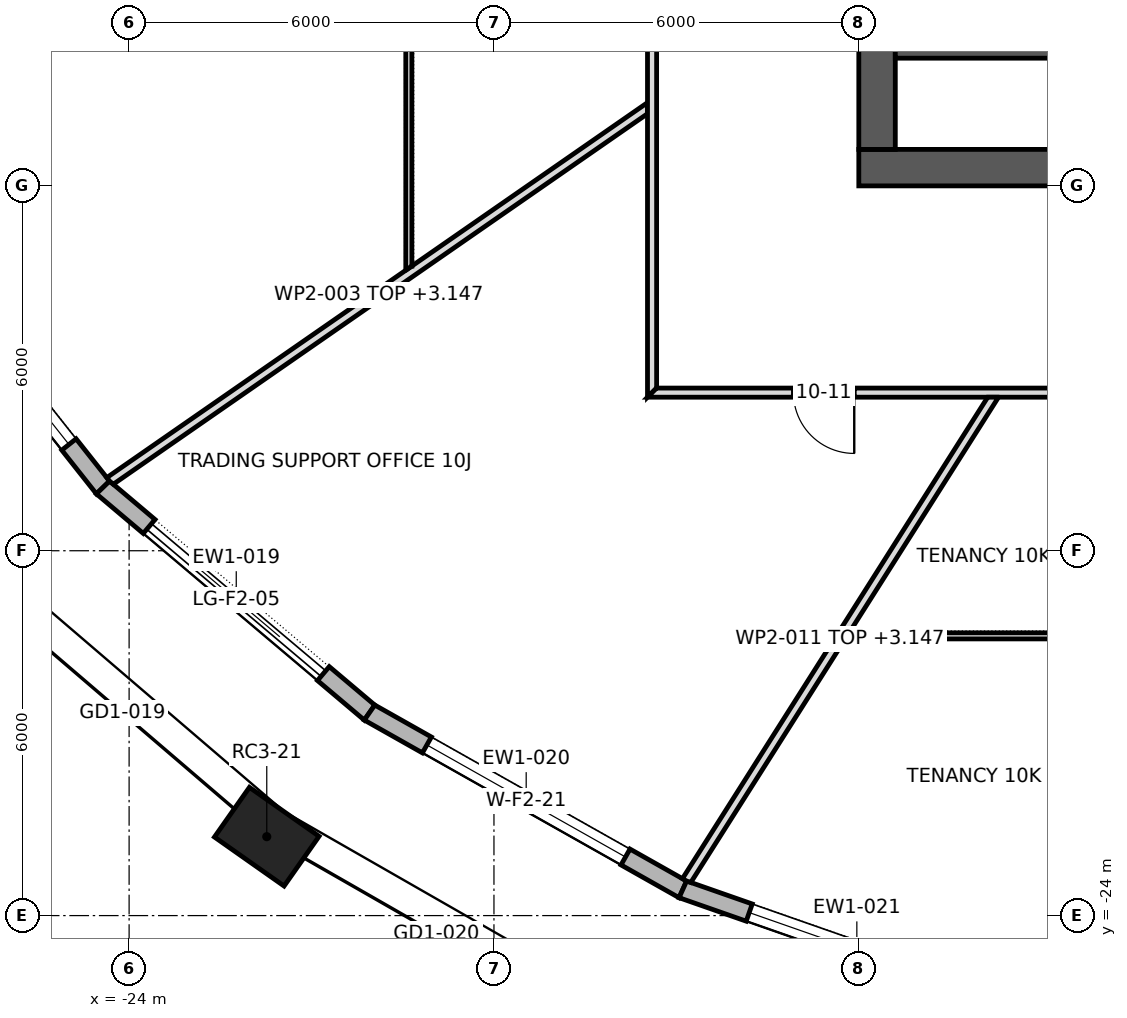
"""IFC4 building model, lengths in metres.
Left out: names, types, materials, properties, quantities, classifications, styles, units other than length and angle.
Written with IfcOpenShell. Run it as: python <this file> out.ifc"""

import sys

from ifc_helpers import new_model, si_unit, direction, frame, frame_2d, origin, origin_2d, place, context, subcontext, project, spatial, polyline, rectangle, outline, extrude, element, fill, save


model = new_model("IFC4")
c1 = context("Model", 3, precision=1e-05, world=origin(), true_north=direction((0.0, 1.0)))
c2 = subcontext(c1, "Body", "Model", "MODEL_VIEW")
j1 = project(units=[si_unit("LENGTHUNIT", "METRE"), si_unit("PLANEANGLEUNIT", "RADIAN")], contexts=[c1])
p1 = place(None, origin())
s1 = spatial("IfcSite", under=j1, at=p1, CompositionType="ELEMENT")
p2 = place(p1, origin())
s2 = spatial("IfcBuilding", under=s1, at=p2, CompositionType="ELEMENT")
p3 = place(p2, frame((0.0, 0.0, 142.3)))
s3 = spatial("IfcBuildingStorey", under=s2, at=p3, CompositionType="ELEMENT", Elevation=142.3)
p4 = place(p3, frame((-21.736, -22.702, 0.0), z_axis=(0.0, 0.0, 1.0), x_axis=(0.817907783846, -0.57534933486, 0.0)))
e1 = element("IfcColumn", 1, at=p4, inside=s3, PredefinedType="COLUMN", context=c2, shape_type="SweptSolid", body=[
    extrude(rectangle(XDim=1.4, YDim=1.0, at=origin_2d()), origin(), (0.0, 0.0, 1.0), 4.2),
])
p5 = place(p3, frame((-12.0, -11.7, 0.0), z_axis=(0.0, 0.0, 1.0), x_axis=(1.0, 0.0, 0.0)))
e2 = element("IfcWall", 2, at=p5, inside=s3, PredefinedType="SHEAR", context=c2, shape_type="SweptSolid", body=[
    extrude(rectangle(XDim=24.0, YDim=0.6, at=frame_2d((12.0, 0.0))), origin(), (0.0, 0.0, 1.0), 4.2),
])
p6 = place(p5, frame((9.975, 0.0, 0.0)))
e3 = element("IfcOpeningElement", 3, at=p6, cuts=e2, PredefinedType="OPENING", context=c2, shape_type="SweptSolid", body=[
    extrude(rectangle(XDim=0.9, YDim=2.1, at=frame_2d((0.45, 1.05))), frame((0.0, 0.312, 0.0), z_axis=(0.0, -1.0, 0.0), x_axis=(1.0, 0.0, 0.0)), (0.0, 0.0, 1.0), 0.624),
])
p7 = place(p5, frame((3.8, 0.0, 0.0)))
e4 = element("IfcOpeningElement", 4, at=p7, cuts=e2, PredefinedType="OPENING", context=c2, shape_type="SweptSolid", body=[
    extrude(rectangle(XDim=0.8, YDim=2.1, at=frame_2d((0.4, 1.05))), frame((0.0, 0.312, 0.0), z_axis=(0.0, -1.0, 0.0), x_axis=(1.0, 0.0, 0.0)), (0.0, 0.0, 1.0), 0.624),
])
p8 = place(p5, frame((5.8, 0.0, 0.0)))
e5 = element("IfcOpeningElement", 5, at=p8, cuts=e2, PredefinedType="OPENING", context=c2, shape_type="SweptSolid", body=[
    extrude(rectangle(XDim=0.8, YDim=2.1, at=frame_2d((0.4, 1.05))), frame((0.0, 0.312, 0.0), z_axis=(0.0, -1.0, 0.0), x_axis=(1.0, 0.0, 0.0)), (0.0, 0.0, 1.0), 0.624),
])
p9 = place(p5, frame((7.5, 0.0, 0.0)))
e6 = element("IfcOpeningElement", 6, at=p9, cuts=e2, PredefinedType="OPENING", context=c2, shape_type="SweptSolid", body=[
    extrude(rectangle(XDim=0.8, YDim=2.1, at=frame_2d((0.4, 1.05))), frame((0.0, 0.312, 0.0), z_axis=(0.0, -1.0, 0.0), x_axis=(1.0, 0.0, 0.0)), (0.0, 0.0, 1.0), 0.624),
])
p10 = place(p5, frame((15.85, 0.0, 0.0)))
e7 = element("IfcOpeningElement", 7, at=p10, cuts=e2, PredefinedType="OPENING", context=c2, shape_type="SweptSolid", body=[
    extrude(rectangle(XDim=0.8, YDim=2.1, at=frame_2d((0.4, 1.05))), frame((0.0, 0.312, 0.0), z_axis=(0.0, -1.0, 0.0), x_axis=(1.0, 0.0, 0.0)), (0.0, 0.0, 1.0), 0.624),
])
p11 = place(p3, frame((-11.7, -11.4, 0.0), z_axis=(0.0, 0.0, 1.0), x_axis=(0.0, 1.0, 0.0)))
e8 = element("IfcWall", 8, at=p11, inside=s3, PredefinedType="SHEAR", context=c2, shape_type="SweptSolid", body=[
    extrude(rectangle(XDim=22.8, YDim=0.6, at=frame_2d((11.4, 0.0))), origin(), (0.0, 0.0, 1.0), 4.2),
])
p12 = place(p11, frame((10.2, 0.0, 0.0)))
e9 = element("IfcOpeningElement", 9, at=p12, cuts=e8, PredefinedType="OPENING", context=c2, shape_type="SweptSolid", body=[
    extrude(rectangle(XDim=2.4, YDim=2.1, at=frame_2d((1.2, 1.05))), frame((0.0, 0.312, 0.0), z_axis=(0.0, -1.0, 0.0), x_axis=(1.0, 0.0, 0.0)), (0.0, 0.0, 1.0), 0.624),
])
p13 = place(p11, frame((18.925, 0.0, 0.0)))
e10 = element("IfcOpeningElement", 10, at=p13, cuts=e8, PredefinedType="OPENING", context=c2, shape_type="SweptSolid", body=[
    extrude(rectangle(XDim=1.2, YDim=2.1, at=frame_2d((0.6, 1.05))), frame((0.0, 0.312, 0.0), z_axis=(0.0, -1.0, 0.0), x_axis=(1.0, 0.0, 0.0)), (0.0, 0.0, 1.0), 0.624),
])
p14 = place(p11, frame((2.675, 0.0, 0.0)))
e11 = element("IfcOpeningElement", 11, at=p14, cuts=e8, PredefinedType="OPENING", context=c2, shape_type="SweptSolid", body=[
    extrude(rectangle(XDim=1.2, YDim=2.1, at=frame_2d((0.6, 1.05))), frame((0.0, 0.312, 0.0), z_axis=(0.0, -1.0, 0.0), x_axis=(1.0, 0.0, 0.0)), (0.0, 0.0, 1.0), 0.624),
])
p15 = place(p3, frame((-27.876, -12.605, 0.0), z_axis=(0.0, 0.0, 1.0), x_axis=(0.620520511988, -0.784190215574, 0.0)))
e12 = element("IfcWall", 12, at=p15, inside=s3, PredefinedType="STANDARD", context=c2, shape_type="SweptSolid", body=[
    extrude(outline(polyline([(-0.016, -0.15), (5.569, -0.15), (5.538, 0.15), (0.016, 0.15), (-0.016, -0.15)])), origin(), (0.0, 0.0, 1.0), 3.9),
])
p16 = place(p15, frame((0.902, 0.0, 0.6)))
e13 = element("IfcOpeningElement", 13, at=p16, cuts=e12, PredefinedType="OPENING", context=c2, shape_type="SweptSolid", body=[
    extrude(rectangle(XDim=3.75, YDim=2.85, at=frame_2d((1.875, 1.425))), frame((0.0, 0.162, 0.0), z_axis=(0.0, -1.0, 0.0), x_axis=(1.0, 0.0, 0.0)), (0.0, 0.0, 1.0), 0.324),
])
p17 = place(p3, frame((-24.43, -16.96, 0.0), z_axis=(0.0, 0.0, 1.0), x_axis=(0.764047627809, -0.64515984255, 0.0)))
e14 = element("IfcWall", 14, at=p17, inside=s3, PredefinedType="STANDARD", context=c2, shape_type="SweptSolid", body=[
    extrude(outline(polyline([(-0.015, -0.15), (5.752, -0.15), (5.723, 0.15), (0.015, 0.15), (-0.015, -0.15)])), origin(), (0.0, 0.0, 1.0), 3.9),
])
p18 = place(p17, frame((0.994, 0.0, 0.0)))
e15 = element("IfcOpeningElement", 15, at=p18, cuts=e14, PredefinedType="OPENING", context=c2, shape_type="SweptSolid", body=[
    extrude(rectangle(XDim=3.75, YDim=3.45, at=frame_2d((1.875, 1.725))), frame((0.0, 0.162, 0.0), z_axis=(0.0, -1.0, 0.0), x_axis=(1.0, 0.0, 0.0)), (0.0, 0.0, 1.0), 0.324),
])
p19 = place(p3, frame((-20.046, -20.661, 0.0), z_axis=(0.0, 0.0, 1.0), x_axis=(0.870912346166, -0.491438384028, 0.0)))
e16 = element("IfcWall", 16, at=p19, inside=s3, PredefinedType="STANDARD", context=c2, shape_type="SweptSolid", body=[
    extrude(outline(polyline([(-0.014, -0.15), (5.929, -0.15), (5.902, 0.15), (0.014, 0.15), (-0.014, -0.15)])), origin(), (0.0, 0.0, 1.0), 3.9),
])
p20 = place(p19, frame((1.083, 0.0, 0.6)))
e17 = element("IfcOpeningElement", 17, at=p20, cuts=e16, PredefinedType="OPENING", context=c2, shape_type="SweptSolid", body=[
    extrude(rectangle(XDim=3.75, YDim=2.85, at=frame_2d((1.875, 1.425))), frame((0.0, 0.162, 0.0), z_axis=(0.0, -1.0, 0.0), x_axis=(1.0, 0.0, 0.0)), (0.0, 0.0, 1.0), 0.324),
])
p21 = place(p3, frame((-14.894, -23.569, 0.0), z_axis=(0.0, 0.0, 1.0), x_axis=(0.943925510212, -0.330158494016, 0.0)))
e18 = element("IfcWall", 18, at=p21, inside=s3, PredefinedType="STANDARD", context=c2, shape_type="SweptSolid", body=[
    extrude(outline(polyline([(-0.013, -0.15), (6.076, -0.15), (6.05, 0.15), (0.013, 0.15), (-0.013, -0.15)])), origin(), (0.0, 0.0, 1.0), 3.9),
])
p22 = place(p21, frame((1.156, 0.0, 0.6)))
e19 = element("IfcOpeningElement", 19, at=p22, cuts=e18, PredefinedType="OPENING", context=c2, shape_type="SweptSolid", body=[
    extrude(rectangle(XDim=3.75, YDim=2.85, at=frame_2d((1.875, 1.425))), frame((0.0, 0.162, 0.0), z_axis=(0.0, -1.0, 0.0), x_axis=(1.0, 0.0, 0.0)), (0.0, 0.0, 1.0), 0.324),
])
p23 = place(p3, frame((-11.4, -9.825, 0.0), z_axis=(0.0, 0.0, 1.0), x_axis=(1.0, 0.0, 0.0)))
e20 = element("IfcWall", 20, at=p23, inside=s3, PredefinedType="SHEAR", context=c2, shape_type="SweptSolid", body=[
    extrude(rectangle(XDim=8.0, YDim=0.15, at=frame_2d((4.0, 0.0))), origin(), (0.0, 0.0, 1.0), 3.9),
])
p24 = place(p3, frame((-24.324, -16.859, 0.0), z_axis=(0.0, 0.0, 1.0), x_axis=(0.821700462415, 0.569919599652, 0.0)))
e21 = element("IfcWall", 21, at=p24, inside=s3, PredefinedType="PARTITIONING", context=c2, shape_type="SweptSolid", body=[
    extrude(outline(polyline([(0.025, -0.075), (1.807, -0.075), (3.589, -0.075), (5.371, -0.075), (7.153, -0.075), (8.935, -0.075), (10.717, -0.075), (10.82, 0.074), (10.82, 0.075), (9.249, 0.075), (7.677, 0.075), (6.105, 0.075), (6.104, 0.073), (6.102, 0.075), (4.576, 0.075), (3.051, 0.075), (1.525, 0.075), (0.0, 0.075), (0.0, 0.071), (0.004, 0.002), (0.025, -0.075)])), origin(), (0.0, 0.0, 1.0), 3.147),
])
p25 = place(p3, frame((-19.4, -13.387, 0.0), z_axis=(0.0, 0.0, 1.0), x_axis=(0.0, 1.0, 0.0)))
e22 = element("IfcWall", 22, at=p25, inside=s3, PredefinedType="PARTITIONING", context=c2, shape_type="SweptSolid", body=[
    extrude(outline(polyline([(11.703, -0.05), (11.703, -0.046), (11.695, 0.05), (10.028, 0.05), (8.361, 0.05), (8.354, 0.048), (8.353, 0.05), (6.682, 0.05), (5.012, 0.05), (3.341, 0.05), (1.671, 0.05), (0.0, 0.05), (0.0, 0.05), (0.069, -0.05), (2.008, -0.05), (3.947, -0.05), (5.886, -0.05), (7.825, -0.05), (9.764, -0.05), (11.703, -0.05)])), origin(), (0.0, 0.0, 1.0), 3.9),
])
p26 = place(p25, frame((3.732, 0.0, 0.0)))
e23 = element("IfcOpeningElement", 23, at=p26, cuts=e22, PredefinedType="OPENING", context=c2, shape_type="SweptSolid", body=[
    extrude(rectangle(XDim=0.9, YDim=2.1, at=frame_2d((0.45, 1.05))), frame((0.0, 0.062, 0.0), z_axis=(0.0, -1.0, 0.0), x_axis=(1.0, 0.0, 0.0)), (0.0, 0.0, 1.0), 0.124),
])
p27 = place(p3, frame((-15.4, -15.475, 0.0), z_axis=(0.0, 0.0, 1.0), x_axis=(0.0, 1.0, 0.0)))
e24 = element("IfcWall", 24, at=p27, inside=s3, PredefinedType="PARTITIONING", context=c2, shape_type="SweptSolid", body=[
    extrude(outline(polyline([(0.15, -0.075), (2.066, -0.075), (3.981, -0.075), (5.897, -0.075), (7.812, -0.075), (9.728, -0.075), (11.644, -0.075), (13.56, -0.075), (15.475, -0.075), (17.391, -0.075), (19.306, -0.075), (21.222, -0.075), (23.138, -0.075), (25.053, -0.075), (26.969, -0.075), (28.885, -0.075), (30.8, -0.075), (30.95, 0.075), (29.016, 0.075), (27.081, 0.075), (25.147, 0.075), (23.212, 0.075), (21.278, 0.075), (19.344, 0.075), (17.409, 0.075), (15.475, 0.075), (13.541, 0.075), (11.606, 0.075), (9.672, 0.075), (7.738, 0.075), (5.803, 0.075), (3.869, 0.075), (1.935, 0.075), (0.0, 0.075), (0.15, -0.075)])), origin(), (0.0, 0.0, 1.0), 3.9),
])
p28 = place(p27, frame((24.245, 0.0, 0.0)))
e25 = element("IfcOpeningElement", 25, at=p28, cuts=e24, PredefinedType="OPENING", context=c2, shape_type="SweptSolid", body=[
    extrude(rectangle(XDim=1.8, YDim=2.1, at=frame_2d((0.9, 1.05))), frame((0.0, 0.087, 0.0), z_axis=(0.0, -1.0, 0.0), x_axis=(1.0, 0.0, 0.0)), (0.0, 0.0, 1.0), 0.174),
])
p29 = place(p27, frame((16.305, 0.0, 0.0)))
e26 = element("IfcOpeningElement", 26, at=p29, cuts=e24, PredefinedType="OPENING", context=c2, shape_type="SweptSolid", body=[
    extrude(rectangle(XDim=1.0, YDim=2.1, at=frame_2d((0.5, 1.05))), frame((0.0, 0.087, 0.0), z_axis=(0.0, -1.0, 0.0), x_axis=(1.0, 0.0, 0.0)), (0.0, 0.0, 1.0), 0.174),
])
p30 = place(p27, frame((9.0, 0.0, 0.0)))
e27 = element("IfcOpeningElement", 27, at=p30, cuts=e24, PredefinedType="OPENING", context=c2, shape_type="SweptSolid", body=[
    extrude(rectangle(XDim=1.0, YDim=2.1, at=frame_2d((0.5, 1.05))), frame((0.0, 0.087, 0.0), z_axis=(0.0, -1.0, 0.0), x_axis=(1.0, 0.0, 0.0)), (0.0, 0.0, 1.0), 0.174),
])
p31 = place(p3, frame((-15.475, -15.4, 0.0), z_axis=(0.0, 0.0, 1.0), x_axis=(1.0, 0.0, 0.0)))
e28 = element("IfcWall", 28, at=p31, inside=s3, PredefinedType="PARTITIONING", context=c2, shape_type="SweptSolid", body=[
    extrude(outline(polyline([(0.0, -0.075), (1.935, -0.075), (3.869, -0.075), (5.803, -0.075), (7.738, -0.075), (9.672, -0.075), (11.606, -0.075), (13.541, -0.075), (15.475, -0.075), (17.409, -0.075), (19.344, -0.075), (21.278, -0.075), (23.212, -0.075), (25.147, -0.075), (27.081, -0.075), (29.016, -0.075), (30.95, -0.075), (30.8, 0.075), (28.885, 0.075), (26.969, 0.075), (25.053, 0.075), (23.138, 0.075), (21.222, 0.075), (19.306, 0.075), (17.391, 0.075), (15.475, 0.075), (13.56, 0.075), (11.644, 0.075), (9.728, 0.075), (7.812, 0.075), (5.897, 0.075), (3.981, 0.075), (2.066, 0.075), (0.15, 0.075), (0.0, -0.075)])), origin(), (0.0, 0.0, 1.0), 3.9),
])
p32 = place(p31, frame((2.4, 0.0, 0.0)))
e29 = element("IfcOpeningElement", 29, at=p32, cuts=e28, PredefinedType="OPENING", context=c2, shape_type="SweptSolid", body=[
    extrude(rectangle(XDim=1.0, YDim=2.1, at=frame_2d((0.5, 1.05))), frame((0.0, 0.087, 0.0), z_axis=(0.0, -1.0, 0.0), x_axis=(1.0, 0.0, 0.0)), (0.0, 0.0, 1.0), 0.174),
])
p33 = place(p31, frame((18.705, 0.0, 0.0)))
e30 = element("IfcOpeningElement", 30, at=p33, cuts=e28, PredefinedType="OPENING", context=c2, shape_type="SweptSolid", body=[
    extrude(rectangle(XDim=1.0, YDim=2.1, at=frame_2d((0.5, 1.05))), frame((0.0, 0.087, 0.0), z_axis=(0.0, -1.0, 0.0), x_axis=(1.0, 0.0, 0.0)), (0.0, 0.0, 1.0), 0.174),
])
p34 = place(p31, frame((13.535, 0.0, 0.0)))
e31 = element("IfcOpeningElement", 31, at=p34, cuts=e28, PredefinedType="OPENING", context=c2, shape_type="SweptSolid", body=[
    extrude(rectangle(XDim=1.0, YDim=2.1, at=frame_2d((0.5, 1.05))), frame((0.0, 0.087, 0.0), z_axis=(0.0, -1.0, 0.0), x_axis=(1.0, 0.0, 0.0)), (0.0, 0.0, 1.0), 0.174),
])
p35 = place(p31, frame((7.695, 0.0, 0.0)))
e32 = element("IfcOpeningElement", 32, at=p35, cuts=e28, PredefinedType="OPENING", context=c2, shape_type="SweptSolid", body=[
    extrude(rectangle(XDim=1.0, YDim=2.1, at=frame_2d((0.5, 1.05))), frame((0.0, 0.087, 0.0), z_axis=(0.0, -1.0, 0.0), x_axis=(1.0, 0.0, 0.0)), (0.0, 0.0, 1.0), 0.174),
])
p36 = place(p31, frame((25.04, 0.0, 0.0)))
e33 = element("IfcOpeningElement", 33, at=p36, cuts=e28, PredefinedType="OPENING", context=c2, shape_type="SweptSolid", body=[
    extrude(rectangle(XDim=1.8, YDim=2.1, at=frame_2d((0.9, 1.05))), frame((0.0, 0.087, 0.0), z_axis=(0.0, -1.0, 0.0), x_axis=(1.0, 0.0, 0.0)), (0.0, 0.0, 1.0), 0.174),
])
p37 = place(p3, frame((-14.837, -23.432, 0.0), z_axis=(0.0, 0.0, 1.0), x_axis=(0.535485065479, 0.844544696655, 0.0)))
e34 = element("IfcWall", 34, at=p37, inside=s3, PredefinedType="PARTITIONING", context=c2, shape_type="SweptSolid", body=[
    extrude(outline(polyline([(0.02, -0.075), (1.639, -0.075), (3.257, -0.075), (4.876, -0.075), (4.88, -0.073), (4.881, -0.075), (6.411, -0.075), (7.94, -0.075), (9.469, -0.075), (9.469, -0.074), (9.375, 0.075), (7.5, 0.075), (5.625, 0.075), (3.75, 0.075), (1.875, 0.075), (0.0, 0.075), (0.0, 0.066), (0.004, -0.004), (0.02, -0.075)])), origin(), (0.0, 0.0, 1.0), 3.147),
])
p38 = place(p3, frame((-12.222, -19.4, 0.0), z_axis=(0.0, 0.0, 1.0), x_axis=(1.0, 0.0, 0.0)))
e35 = element("IfcWall", 35, at=p38, inside=s3, PredefinedType="PARTITIONING", context=c2, shape_type="SweptSolid", body=[
    extrude(outline(polyline([(0.0, -0.05), (1.981, -0.05), (3.962, -0.05), (5.944, -0.05), (7.925, -0.05), (9.906, -0.05), (9.906, -0.049), (9.916, -0.05), (11.759, -0.05), (13.602, -0.05), (15.444, -0.05), (17.287, -0.05), (19.13, -0.05), (19.13, -0.05), (19.094, 0.05), (17.464, 0.05), (15.833, 0.05), (14.202, 0.05), (14.202, 0.05), (14.102, 0.05), (14.102, 0.05), (12.442, 0.05), (10.782, 0.05), (9.122, 0.05), (7.462, 0.05), (7.462, 0.05), (7.362, 0.05), (7.362, 0.05), (5.538, 0.05), (3.713, 0.05), (1.888, 0.05), (0.063, 0.05), (0.0, -0.049), (0.0, -0.05)])), origin(), (0.0, 0.0, 1.0), 3.9),
])
p39 = place(p38, frame((8.238, 0.0, 0.0)))
e36 = element("IfcOpeningElement", 36, at=p39, cuts=e35, PredefinedType="OPENING", context=c2, shape_type="SweptSolid", body=[
    extrude(rectangle(XDim=0.9, YDim=2.1, at=frame_2d((0.45, 1.05))), frame((0.0, 0.062, 0.0), z_axis=(0.0, -1.0, 0.0), x_axis=(1.0, 0.0, 0.0)), (0.0, 0.0, 1.0), 0.124),
])
p40 = place(p16, origin())
e37 = element("IfcWindow", 37, at=p40, inside=s3, PartitioningType="TRIPLE_PANEL_VERTICAL", PredefinedType="WINDOW", context=c2, shape_type="SweptSolid", body=[
    extrude(rectangle(XDim=3.75, YDim=2.85, at=frame_2d((1.875, 1.425))), frame((0.0, 0.03, 0.0), z_axis=(0.0, -1.0, 0.0), x_axis=(1.0, 0.0, 0.0)), (0.0, 0.0, 1.0), 0.06),
])
fill(e13, e37)
p41 = place(p18, origin())
e38 = element("IfcDoor", 38, at=p41, inside=s3, OperationType="DOUBLE_DOOR_SLIDING", PredefinedType="DOOR", context=c2, shape_type="SweptSolid", body=[
    extrude(rectangle(XDim=3.75, YDim=3.45, at=frame_2d((1.875, 1.725))), frame((0.0, 0.025, 0.0), z_axis=(0.0, -1.0, 0.0), x_axis=(1.0, 0.0, 0.0)), (0.0, 0.0, 1.0), 0.05),
])
fill(e15, e38)
p42 = place(p20, origin())
e39 = element("IfcWindow", 39, at=p42, inside=s3, PartitioningType="TRIPLE_PANEL_VERTICAL", PredefinedType="WINDOW", context=c2, shape_type="SweptSolid", body=[
    extrude(rectangle(XDim=3.75, YDim=2.85, at=frame_2d((1.875, 1.425))), frame((0.0, 0.03, 0.0), z_axis=(0.0, -1.0, 0.0), x_axis=(1.0, 0.0, 0.0)), (0.0, 0.0, 1.0), 0.06),
])
fill(e17, e39)
p43 = place(p22, origin())
e40 = element("IfcWindow", 40, at=p43, inside=s3, PartitioningType="TRIPLE_PANEL_VERTICAL", PredefinedType="WINDOW", context=c2, shape_type="SweptSolid", body=[
    extrude(rectangle(XDim=3.75, YDim=2.85, at=frame_2d((1.875, 1.425))), frame((0.0, 0.03, 0.0), z_axis=(0.0, -1.0, 0.0), x_axis=(1.0, 0.0, 0.0)), (0.0, 0.0, 1.0), 0.06),
])
fill(e19, e40)
p44 = place(p32, frame((1.0, 0.0, 0.0), z_axis=(0.0, 0.0, 1.0), x_axis=(-1.0, 0.0, 0.0)))
e41 = element("IfcDoor", 41, at=p44, inside=s3, OperationType="SINGLE_SWING_RIGHT", PredefinedType="DOOR", context=c2, shape_type="SweptSolid", body=[
    extrude(rectangle(XDim=1.0, YDim=2.1, at=frame_2d((0.5, 1.05))), frame((0.0, 0.025, 0.0), z_axis=(0.0, -1.0, 0.0), x_axis=(1.0, 0.0, 0.0)), (0.0, 0.0, 1.0), 0.05),
])
fill(e29, e41)
save(model, sys.argv[1])
